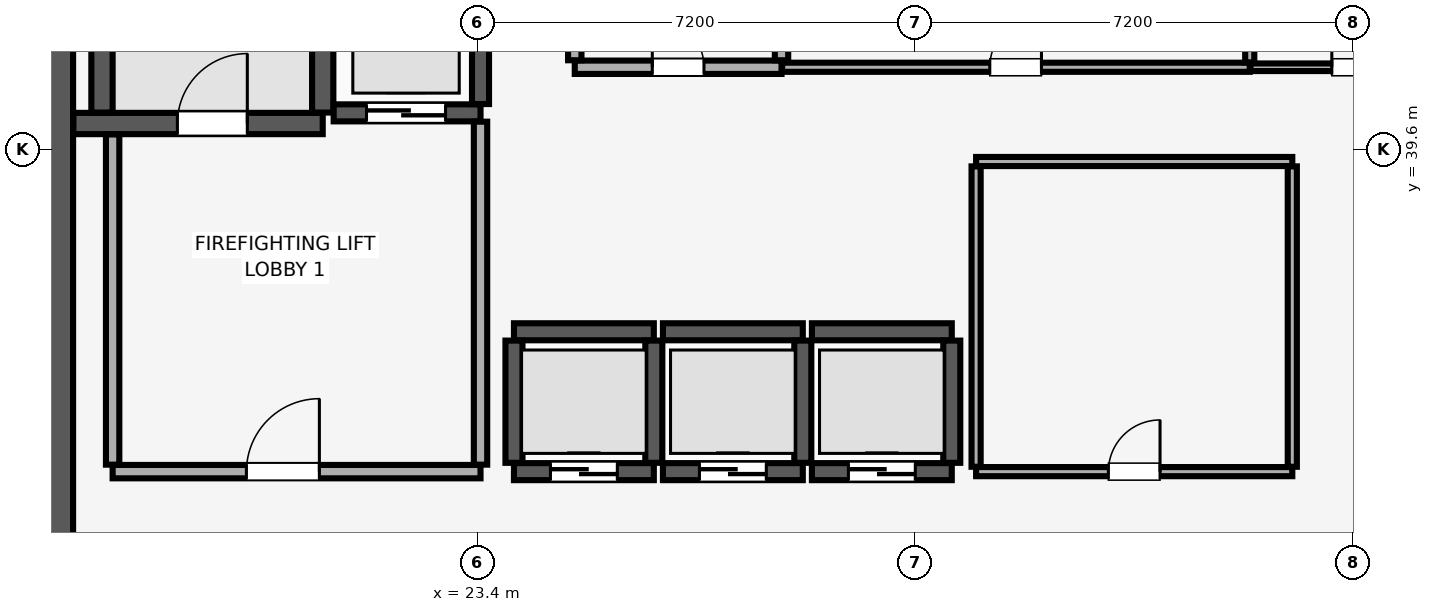
"""IFC4 building model, lengths in metres.
Left out: names, types, materials, properties, quantities, classifications, styles, units other than length and angle.
Written with IfcOpenShell. Run it as: python <this file> out.ifc"""

import sys

from ifc_helpers import new_model, si_unit, direction, frame, frame_2d, origin, place, context, subcontext, project, spatial, rectangle, extrude, element, fill, save


model = new_model("IFC4")
c1 = context("Model", 3, precision=1e-05, world=origin(), true_north=direction((0.0, 1.0)))
c2 = subcontext(c1, "Body", "Model", "MODEL_VIEW")
j1 = project(units=[si_unit("LENGTHUNIT", "METRE"), si_unit("PLANEANGLEUNIT", "RADIAN")], contexts=[c1])
p1 = place(None, origin())
s1 = spatial("IfcSite", under=j1, at=p1, CompositionType="ELEMENT")
p2 = place(p1, origin())
s2 = spatial("IfcBuilding", under=s1, at=p2, CompositionType="ELEMENT")
p3 = place(p2, frame((0.0, 0.0, 19.4)))
s3 = spatial("IfcBuildingStorey", under=s2, at=p3, CompositionType="ELEMENT", Elevation=19.4)
p4 = place(p3, frame((16.2, 29.4, 0.0), z_axis=(0.0, 0.0, 1.0), x_axis=(0.0, 1.0, 0.0)))
e1 = element("IfcWall", 1, at=p4, inside=s3, PredefinedType="SHEAR", context=c2, shape_type="SweptSolid", body=[
    extrude(rectangle(XDim=19.2, YDim=1.1, at=frame_2d((9.6, 0.0))), origin(), (0.0, 0.0, 1.0), 6.28),
])
p5 = place(p3, frame((16.755, 40.025, 0.0), z_axis=(0.0, 0.0, 1.0), x_axis=(1.0, 0.0, 0.0)))
e2 = element("IfcWall", 2, at=p5, inside=s3, PredefinedType="SHEAR", context=c2, shape_type="SweptSolid", body=[
    extrude(rectangle(XDim=4.1, YDim=0.35, at=frame_2d((2.05, 0.0))), origin(), (0.0, 0.0, 1.0), 6.28),
])
p6 = place(p5, frame((1.71, 0.0, 0.0)))
e3 = element("IfcOpeningElement", 3, at=p6, cuts=e2, PredefinedType="OPENING", context=c2, shape_type="SweptSolid", body=[
    extrude(rectangle(XDim=1.15, YDim=2.15, at=frame_2d((0.575, 1.075))), frame((0.0, 0.185, 0.0), z_axis=(0.0, -1.0, 0.0), x_axis=(1.0, 0.0, 0.0)), (0.0, 0.0, 1.0), 0.37),
])
for number, where, z_axis, x_axis in (
    (4, (17.225, 40.205, 0.0), (0.0, 0.0, 1.0), (0.0, 1.0, 0.0)),
    (5, (20.855, 40.205, 0.0), (0.0, 0.0, 1.0), (0.0, 1.0, 0.0)),
):
    element("IfcWall", number, at=place(p3, frame(where, z_axis=z_axis, x_axis=x_axis)), inside=s3, PredefinedType="SHEAR", context=c2, shape_type="SweptSolid", body=[
        extrude(rectangle(XDim=8.09, YDim=0.35, at=frame_2d((4.045, 0.0))), origin(), (0.0, 0.0, 1.0), 6.28),
    ])
p7 = place(p3, frame((24.0, 34.3, 0.0), z_axis=(0.0, 0.0, 1.0), x_axis=(1.0, 0.0, 0.0)))
e6 = element("IfcWall", 6, at=p7, inside=s3, PredefinedType="SHEAR", context=c2, shape_type="SweptSolid", body=[
    extrude(rectangle(XDim=2.3, YDim=0.28, at=frame_2d((1.15, 0.0))), origin(), (0.0, 0.0, 1.0), 6.28),
])
p8 = place(p7, frame((0.6, 0.0, 0.0)))
e7 = element("IfcOpeningElement", 7, at=p8, cuts=e6, PredefinedType="OPENING", context=c2, shape_type="SweptSolid", body=[
    extrude(rectangle(XDim=1.1, YDim=2.2, at=frame_2d((0.55, 1.1))), frame((0.0, 0.15, 0.0), z_axis=(0.0, -1.0, 0.0), x_axis=(1.0, 0.0, 0.0)), (0.0, 0.0, 1.0), 0.3),
])
p9 = place(p3, frame((24.0, 36.6, 0.0), z_axis=(0.0, 0.0, 1.0), x_axis=(1.0, 0.0, 0.0)))
e8 = element("IfcWall", 8, at=p9, inside=s3, PredefinedType="SHEAR", context=c2, shape_type="SweptSolid", body=[
    extrude(rectangle(XDim=2.3, YDim=0.28, at=frame_2d((1.15, 0.0))), origin(), (0.0, 0.0, 1.0), 6.28),
])
for number, where, z_axis, x_axis in (
    (9, (24.0, 34.445, 0.0), (0.0, 0.0, 1.0), (0.0, 1.0, 0.0)),
    (10, (26.3, 34.445, 0.0), (0.0, 0.0, 1.0), (0.0, 1.0, 0.0)),
):
    element("IfcWall", number, at=place(p3, frame(where, z_axis=z_axis, x_axis=x_axis)), inside=s3, PredefinedType="SHEAR", context=c2, shape_type="SweptSolid", body=[
        extrude(rectangle(XDim=2.01, YDim=0.28, at=frame_2d((1.005, 0.0))), origin(), (0.0, 0.0, 1.0), 6.28),
    ])
p10 = place(p3, frame((26.45, 34.3, 0.0), z_axis=(0.0, 0.0, 1.0), x_axis=(1.0, 0.0, 0.0)))
e11 = element("IfcWall", 11, at=p10, inside=s3, PredefinedType="SHEAR", context=c2, shape_type="SweptSolid", body=[
    extrude(rectangle(XDim=2.3, YDim=0.28, at=frame_2d((1.15, 0.0))), origin(), (0.0, 0.0, 1.0), 6.28),
])
p11 = place(p10, frame((0.6, 0.0, 0.0)))
e12 = element("IfcOpeningElement", 12, at=p11, cuts=e11, PredefinedType="OPENING", context=c2, shape_type="SweptSolid", body=[
    extrude(rectangle(XDim=1.1, YDim=2.2, at=frame_2d((0.55, 1.1))), frame((0.0, 0.15, 0.0), z_axis=(0.0, -1.0, 0.0), x_axis=(1.0, 0.0, 0.0)), (0.0, 0.0, 1.0), 0.3),
])
p12 = place(p3, frame((26.45, 36.6, 0.0), z_axis=(0.0, 0.0, 1.0), x_axis=(1.0, 0.0, 0.0)))
e13 = element("IfcWall", 13, at=p12, inside=s3, PredefinedType="SHEAR", context=c2, shape_type="SweptSolid", body=[
    extrude(rectangle(XDim=2.3, YDim=0.28, at=frame_2d((1.15, 0.0))), origin(), (0.0, 0.0, 1.0), 6.28),
])
p13 = place(p3, frame((28.75, 34.445, 0.0), z_axis=(0.0, 0.0, 1.0), x_axis=(0.0, 1.0, 0.0)))
e14 = element("IfcWall", 14, at=p13, inside=s3, PredefinedType="SHEAR", context=c2, shape_type="SweptSolid", body=[
    extrude(rectangle(XDim=2.01, YDim=0.28, at=frame_2d((1.005, 0.0))), origin(), (0.0, 0.0, 1.0), 6.28),
])
p14 = place(p3, frame((28.9, 34.3, 0.0), z_axis=(0.0, 0.0, 1.0), x_axis=(1.0, 0.0, 0.0)))
e15 = element("IfcWall", 15, at=p14, inside=s3, PredefinedType="SHEAR", context=c2, shape_type="SweptSolid", body=[
    extrude(rectangle(XDim=2.3, YDim=0.28, at=frame_2d((1.15, 0.0))), origin(), (0.0, 0.0, 1.0), 6.28),
])
p15 = place(p14, frame((0.6, 0.0, 0.0)))
e16 = element("IfcOpeningElement", 16, at=p15, cuts=e15, PredefinedType="OPENING", context=c2, shape_type="SweptSolid", body=[
    extrude(rectangle(XDim=1.1, YDim=2.2, at=frame_2d((0.55, 1.1))), frame((0.0, 0.15, 0.0), z_axis=(0.0, -1.0, 0.0), x_axis=(1.0, 0.0, 0.0)), (0.0, 0.0, 1.0), 0.3),
])
p16 = place(p3, frame((28.9, 36.6, 0.0), z_axis=(0.0, 0.0, 1.0), x_axis=(1.0, 0.0, 0.0)))
e17 = element("IfcWall", 17, at=p16, inside=s3, PredefinedType="SHEAR", context=c2, shape_type="SweptSolid", body=[
    extrude(rectangle(XDim=2.3, YDim=0.28, at=frame_2d((1.15, 0.0))), origin(), (0.0, 0.0, 1.0), 6.28),
])
p17 = place(p3, frame((31.2, 34.445, 0.0), z_axis=(0.0, 0.0, 1.0), x_axis=(0.0, 1.0, 0.0)))
e18 = element("IfcWall", 18, at=p17, inside=s3, PredefinedType="SHEAR", context=c2, shape_type="SweptSolid", body=[
    extrude(rectangle(XDim=2.01, YDim=0.28, at=frame_2d((1.005, 0.0))), origin(), (0.0, 0.0, 1.0), 6.28),
])
p18 = place(p3, frame((21.035, 40.2, 0.0), z_axis=(0.0, 0.0, 1.0), x_axis=(1.0, 0.0, 0.0)))
e19 = element("IfcWall", 19, at=p18, inside=s3, PredefinedType="SHEAR", context=c2, shape_type="SweptSolid", body=[
    extrude(rectangle(XDim=2.415, YDim=0.28, at=frame_2d((1.208, 0.0))), origin(), (0.0, 0.0, 1.0), 6.28),
])
p19 = place(p18, frame((0.54, 0.0, 0.0)))
e20 = element("IfcOpeningElement", 20, at=p19, cuts=e19, PredefinedType="OPENING", context=c2, shape_type="SweptSolid", body=[
    extrude(rectangle(XDim=1.3, YDim=2.3, at=frame_2d((0.65, 1.15))), frame((0.0, 0.15, 0.0), z_axis=(0.0, -1.0, 0.0), x_axis=(1.0, 0.0, 0.0)), (0.0, 0.0, 1.0), 0.3),
])
p20 = place(p3, frame((23.45, 40.345, 0.0), z_axis=(0.0, 0.0, 1.0), x_axis=(0.0, 1.0, 0.0)))
e21 = element("IfcWall", 21, at=p20, inside=s3, PredefinedType="SHEAR", context=c2, shape_type="SweptSolid", body=[
    extrude(rectangle(XDim=2.81, YDim=0.28, at=frame_2d((1.405, 0.0))), origin(), (0.0, 0.0, 1.0), 6.28),
])
p21 = place(p3, frame((17.4, 34.3, 0.0), z_axis=(0.0, 0.0, 1.0), x_axis=(1.0, 0.0, 0.0)))
e22 = element("IfcWall", 22, at=p21, inside=s3, PredefinedType="PARTITIONING", context=c2, shape_type="SweptSolid", body=[
    extrude(rectangle(XDim=6.05, YDim=0.22, at=frame_2d((3.025, 0.0))), origin(), (0.0, 0.0, 1.0), 6.28),
])
p22 = place(p21, frame((2.2, 0.0, 0.0)))
e23 = element("IfcOpeningElement", 23, at=p22, cuts=e22, PredefinedType="OPENING", context=c2, shape_type="SweptSolid", body=[
    extrude(rectangle(XDim=1.2, YDim=2.15, at=frame_2d((0.6, 1.075))), frame((0.0, 0.12, 0.0), z_axis=(0.0, -1.0, 0.0), x_axis=(1.0, 0.0, 0.0)), (0.0, 0.0, 1.0), 0.24),
])
p23 = place(p3, frame((17.4, 34.415, 0.0), z_axis=(0.0, 0.0, 1.0), x_axis=(0.0, 1.0, 0.0)))
e24 = element("IfcWall", 24, at=p23, inside=s3, PredefinedType="PARTITIONING", context=c2, shape_type="SweptSolid", body=[
    extrude(rectangle(XDim=5.43, YDim=0.22, at=frame_2d((2.715, 0.0))), origin(), (0.0, 0.0, 1.0), 6.28),
])
p24 = place(p3, frame((23.45, 34.415, 0.0), z_axis=(0.0, 0.0, 1.0), x_axis=(0.0, 1.0, 0.0)))
e25 = element("IfcWall", 25, at=p24, inside=s3, PredefinedType="PARTITIONING", context=c2, shape_type="SweptSolid", body=[
    extrude(rectangle(XDim=5.64, YDim=0.22, at=frame_2d((2.82, 0.0))), origin(), (0.0, 0.0, 1.0), 6.28),
])
p25 = place(p3, frame((31.6, 34.3, 0.0), z_axis=(0.0, 0.0, 1.0), x_axis=(1.0, 0.0, 0.0)))
e26 = element("IfcWall", 26, at=p25, inside=s3, PredefinedType="PARTITIONING", context=c2, shape_type="SweptSolid", body=[
    extrude(rectangle(XDim=5.2, YDim=0.15, at=frame_2d((2.6, 0.0))), origin(), (0.0, 0.0, 1.0), 6.28),
])
p26 = place(p25, frame((2.175, 0.0, 0.0)))
e27 = element("IfcOpeningElement", 27, at=p26, cuts=e26, PredefinedType="OPENING", context=c2, shape_type="SweptSolid", body=[
    extrude(rectangle(XDim=0.85, YDim=2.1, at=frame_2d((0.425, 1.05))), frame((0.0, 0.085, 0.0), z_axis=(0.0, -1.0, 0.0), x_axis=(1.0, 0.0, 0.0)), (0.0, 0.0, 1.0), 0.17),
])
p27 = place(p3, frame((31.6, 39.4, 0.0), z_axis=(0.0, 0.0, 1.0), x_axis=(1.0, 0.0, 0.0)))
e28 = element("IfcWall", 28, at=p27, inside=s3, PredefinedType="PARTITIONING", context=c2, shape_type="SweptSolid", body=[
    extrude(rectangle(XDim=5.2, YDim=0.15, at=frame_2d((2.6, 0.0))), origin(), (0.0, 0.0, 1.0), 6.28),
])
for number, where, z_axis, x_axis in (
    (29, (31.6, 34.38, 0.0), (0.0, 0.0, 1.0), (0.0, 1.0, 0.0)),
    (30, (36.8, 34.38, 0.0), (0.0, 0.0, 1.0), (0.0, 1.0, 0.0)),
):
    element("IfcWall", number, at=place(p3, frame(where, z_axis=z_axis, x_axis=x_axis)), inside=s3, PredefinedType="PARTITIONING", context=c2, shape_type="SweptSolid", body=[
        extrude(rectangle(XDim=4.94, YDim=0.15, at=frame_2d((2.47, 0.0))), origin(), (0.0, 0.0, 1.0), 6.28),
    ])
p28 = place(p3, frame((25.0, 40.95, 0.0), z_axis=(0.0, 0.0, 1.0), x_axis=(1.0, 0.0, 0.0)))
e31 = element("IfcWall", 31, at=p28, inside=s3, PredefinedType="PARTITIONING", context=c2, shape_type="SweptSolid", body=[
    extrude(rectangle(XDim=3.4, YDim=0.22, at=frame_2d((1.7, 0.0))), origin(), (0.0, 0.0, 1.0), 6.28),
])
p29 = place(p28, frame((1.275, 0.0, 0.0)))
e32 = element("IfcOpeningElement", 32, at=p29, cuts=e31, PredefinedType="OPENING", context=c2, shape_type="SweptSolid", body=[
    extrude(rectangle(XDim=0.85, YDim=2.1, at=frame_2d((0.425, 1.05))), frame((0.0, 0.12, 0.0), z_axis=(0.0, -1.0, 0.0), x_axis=(1.0, 0.0, 0.0)), (0.0, 0.0, 1.0), 0.24),
])
for number, where, z_axis, x_axis in (
    (33, (25.0, 41.065, 0.0), (0.0, 0.0, 1.0), (0.0, 1.0, 0.0)),
    (34, (28.4, 41.065, 0.0), (0.0, 0.0, 1.0), (0.0, 1.0, 0.0)),
):
    element("IfcWall", number, at=place(p3, frame(where, z_axis=z_axis, x_axis=x_axis)), inside=s3, PredefinedType="PARTITIONING", context=c2, shape_type="SweptSolid", body=[
        extrude(rectangle(XDim=7.12, YDim=0.22, at=frame_2d((3.56, 0.0))), origin(), (0.0, 0.0, 1.0), 6.28),
    ])
p30 = place(p3, frame((28.41, 40.95, 0.0), z_axis=(0.0, 0.0, 1.0), x_axis=(1.0, 0.0, 0.0)))
e35 = element("IfcWall", 35, at=p30, inside=s3, PredefinedType="PARTITIONING", context=c2, shape_type="SweptSolid", body=[
    extrude(rectangle(XDim=7.69, YDim=0.15, at=frame_2d((3.845, 0.0))), origin(), (0.0, 0.0, 1.0), 6.28),
])
p31 = place(p30, frame((3.415, 0.0, 0.0)))
e36 = element("IfcOpeningElement", 36, at=p31, cuts=e35, PredefinedType="OPENING", context=c2, shape_type="SweptSolid", body=[
    extrude(rectangle(XDim=0.85, YDim=2.1, at=frame_2d((0.425, 1.05))), frame((0.0, 0.085, 0.0), z_axis=(0.0, -1.0, 0.0), x_axis=(1.0, 0.0, 0.0)), (0.0, 0.0, 1.0), 0.17),
])
p32 = place(p3, frame((36.1, 41.03, 0.0), z_axis=(0.0, 0.0, 1.0), x_axis=(0.0, 1.0, 0.0)))
e37 = element("IfcWall", 37, at=p32, inside=s3, PredefinedType="PARTITIONING", context=c2, shape_type="SweptSolid", body=[
    extrude(rectangle(XDim=7.19, YDim=0.15, at=frame_2d((3.595, 0.0))), origin(), (0.0, 0.0, 1.0), 6.28),
])
p33 = place(p3, frame((36.11, 40.95, 0.0), z_axis=(0.0, 0.0, 1.0), x_axis=(1.0, 0.0, 0.0)))
e38 = element("IfcWall", 38, at=p33, inside=s3, PredefinedType="PARTITIONING", context=c2, shape_type="SweptSolid", body=[
    extrude(rectangle(XDim=3.59, YDim=0.125, at=frame_2d((1.795, 0.0))), origin(), (0.0, 0.0, 1.0), 6.28),
])
p34 = place(p33, frame((1.34, 0.0, 0.0)))
e39 = element("IfcOpeningElement", 39, at=p34, cuts=e38, PredefinedType="OPENING", context=c2, shape_type="SweptSolid", body=[
    extrude(rectangle(XDim=0.9, YDim=2.1, at=frame_2d((0.45, 1.05))), frame((0.0, 0.073, 0.0), z_axis=(0.0, -1.0, 0.0), x_axis=(1.0, 0.0, 0.0)), (0.0, 0.0, 1.0), 0.145),
])
p35 = place(p6, origin())
e40 = element("IfcDoor", 40, at=p35, inside=s3, OperationType="SINGLE_SWING_RIGHT", PredefinedType="DOOR", context=c2, shape_type="SweptSolid", body=[
    extrude(rectangle(XDim=1.15, YDim=2.15, at=frame_2d((0.575, 1.075))), frame((0.0, 0.025, 0.0), z_axis=(0.0, -1.0, 0.0), x_axis=(1.0, 0.0, 0.0)), (0.0, 0.0, 1.0), 0.05),
])
fill(e3, e40)
p36 = place(p8, origin())
e41 = element("IfcDoor", 41, at=p36, inside=s3, OperationType="DOUBLE_DOOR_SLIDING", PredefinedType="DOOR", context=c2, shape_type="SweptSolid", body=[
    extrude(rectangle(XDim=1.1, YDim=2.2, at=frame_2d((0.55, 1.1))), frame((0.0, 0.025, 0.0), z_axis=(0.0, -1.0, 0.0), x_axis=(1.0, 0.0, 0.0)), (0.0, 0.0, 1.0), 0.05),
])
fill(e7, e41)
p37 = place(p11, origin())
e42 = element("IfcDoor", 42, at=p37, inside=s3, OperationType="DOUBLE_DOOR_SLIDING", PredefinedType="DOOR", context=c2, shape_type="SweptSolid", body=[
    extrude(rectangle(XDim=1.1, YDim=2.2, at=frame_2d((0.55, 1.1))), frame((0.0, 0.025, 0.0), z_axis=(0.0, -1.0, 0.0), x_axis=(1.0, 0.0, 0.0)), (0.0, 0.0, 1.0), 0.05),
])
fill(e12, e42)
p38 = place(p15, origin())
e43 = element("IfcDoor", 43, at=p38, inside=s3, OperationType="DOUBLE_DOOR_SLIDING", PredefinedType="DOOR", context=c2, shape_type="SweptSolid", body=[
    extrude(rectangle(XDim=1.1, YDim=2.2, at=frame_2d((0.55, 1.1))), frame((0.0, 0.025, 0.0), z_axis=(0.0, -1.0, 0.0), x_axis=(1.0, 0.0, 0.0)), (0.0, 0.0, 1.0), 0.05),
])
fill(e16, e43)
p39 = place(p19, origin())
e44 = element("IfcDoor", 44, at=p39, inside=s3, OperationType="DOUBLE_DOOR_SLIDING", PredefinedType="DOOR", context=c2, shape_type="SweptSolid", body=[
    extrude(rectangle(XDim=1.3, YDim=2.3, at=frame_2d((0.65, 1.15))), frame((0.0, 0.025, 0.0), z_axis=(0.0, -1.0, 0.0), x_axis=(1.0, 0.0, 0.0)), (0.0, 0.0, 1.0), 0.05),
])
fill(e20, e44)
p40 = place(p22, origin())
e45 = element("IfcDoor", 45, at=p40, inside=s3, OperationType="SINGLE_SWING_RIGHT", PredefinedType="DOOR", context=c2, shape_type="SweptSolid", body=[
    extrude(rectangle(XDim=1.2, YDim=2.15, at=frame_2d((0.6, 1.075))), frame((0.0, 0.025, 0.0), z_axis=(0.0, -1.0, 0.0), x_axis=(1.0, 0.0, 0.0)), (0.0, 0.0, 1.0), 0.05),
])
fill(e23, e45)
p41 = place(p26, origin())
e46 = element("IfcDoor", 46, at=p41, inside=s3, OperationType="SINGLE_SWING_RIGHT", PredefinedType="DOOR", context=c2, shape_type="SweptSolid", body=[
    extrude(rectangle(XDim=0.85, YDim=2.1, at=frame_2d((0.425, 1.05))), frame((0.0, 0.025, 0.0), z_axis=(0.0, -1.0, 0.0), x_axis=(1.0, 0.0, 0.0)), (0.0, 0.0, 1.0), 0.05),
])
fill(e27, e46)
p42 = place(p29, origin())
e47 = element("IfcDoor", 47, at=p42, inside=s3, OperationType="SINGLE_SWING_LEFT", PredefinedType="DOOR", context=c2, shape_type="SweptSolid", body=[
    extrude(rectangle(XDim=0.85, YDim=2.1, at=frame_2d((0.425, 1.05))), frame((0.0, 0.025, 0.0), z_axis=(0.0, -1.0, 0.0), x_axis=(1.0, 0.0, 0.0)), (0.0, 0.0, 1.0), 0.05),
])
fill(e32, e47)
p43 = place(p31, origin())
e48 = element("IfcDoor", 48, at=p43, inside=s3, OperationType="SINGLE_SWING_RIGHT", PredefinedType="DOOR", context=c2, shape_type="SweptSolid", body=[
    extrude(rectangle(XDim=0.85, YDim=2.1, at=frame_2d((0.425, 1.05))), frame((0.0, 0.025, 0.0), z_axis=(0.0, -1.0, 0.0), x_axis=(1.0, 0.0, 0.0)), (0.0, 0.0, 1.0), 0.05),
])
fill(e36, e48)
p44 = place(p34, origin())
e49 = element("IfcDoor", 49, at=p44, inside=s3, OperationType="SINGLE_SWING_LEFT", PredefinedType="DOOR", context=c2, shape_type="SweptSolid", body=[
    extrude(rectangle(XDim=0.9, YDim=2.1, at=frame_2d((0.45, 1.05))), frame((0.0, 0.025, 0.0), z_axis=(0.0, -1.0, 0.0), x_axis=(1.0, 0.0, 0.0)), (0.0, 0.0, 1.0), 0.05),
])
fill(e39, e49)
save(model, sys.argv[1])
